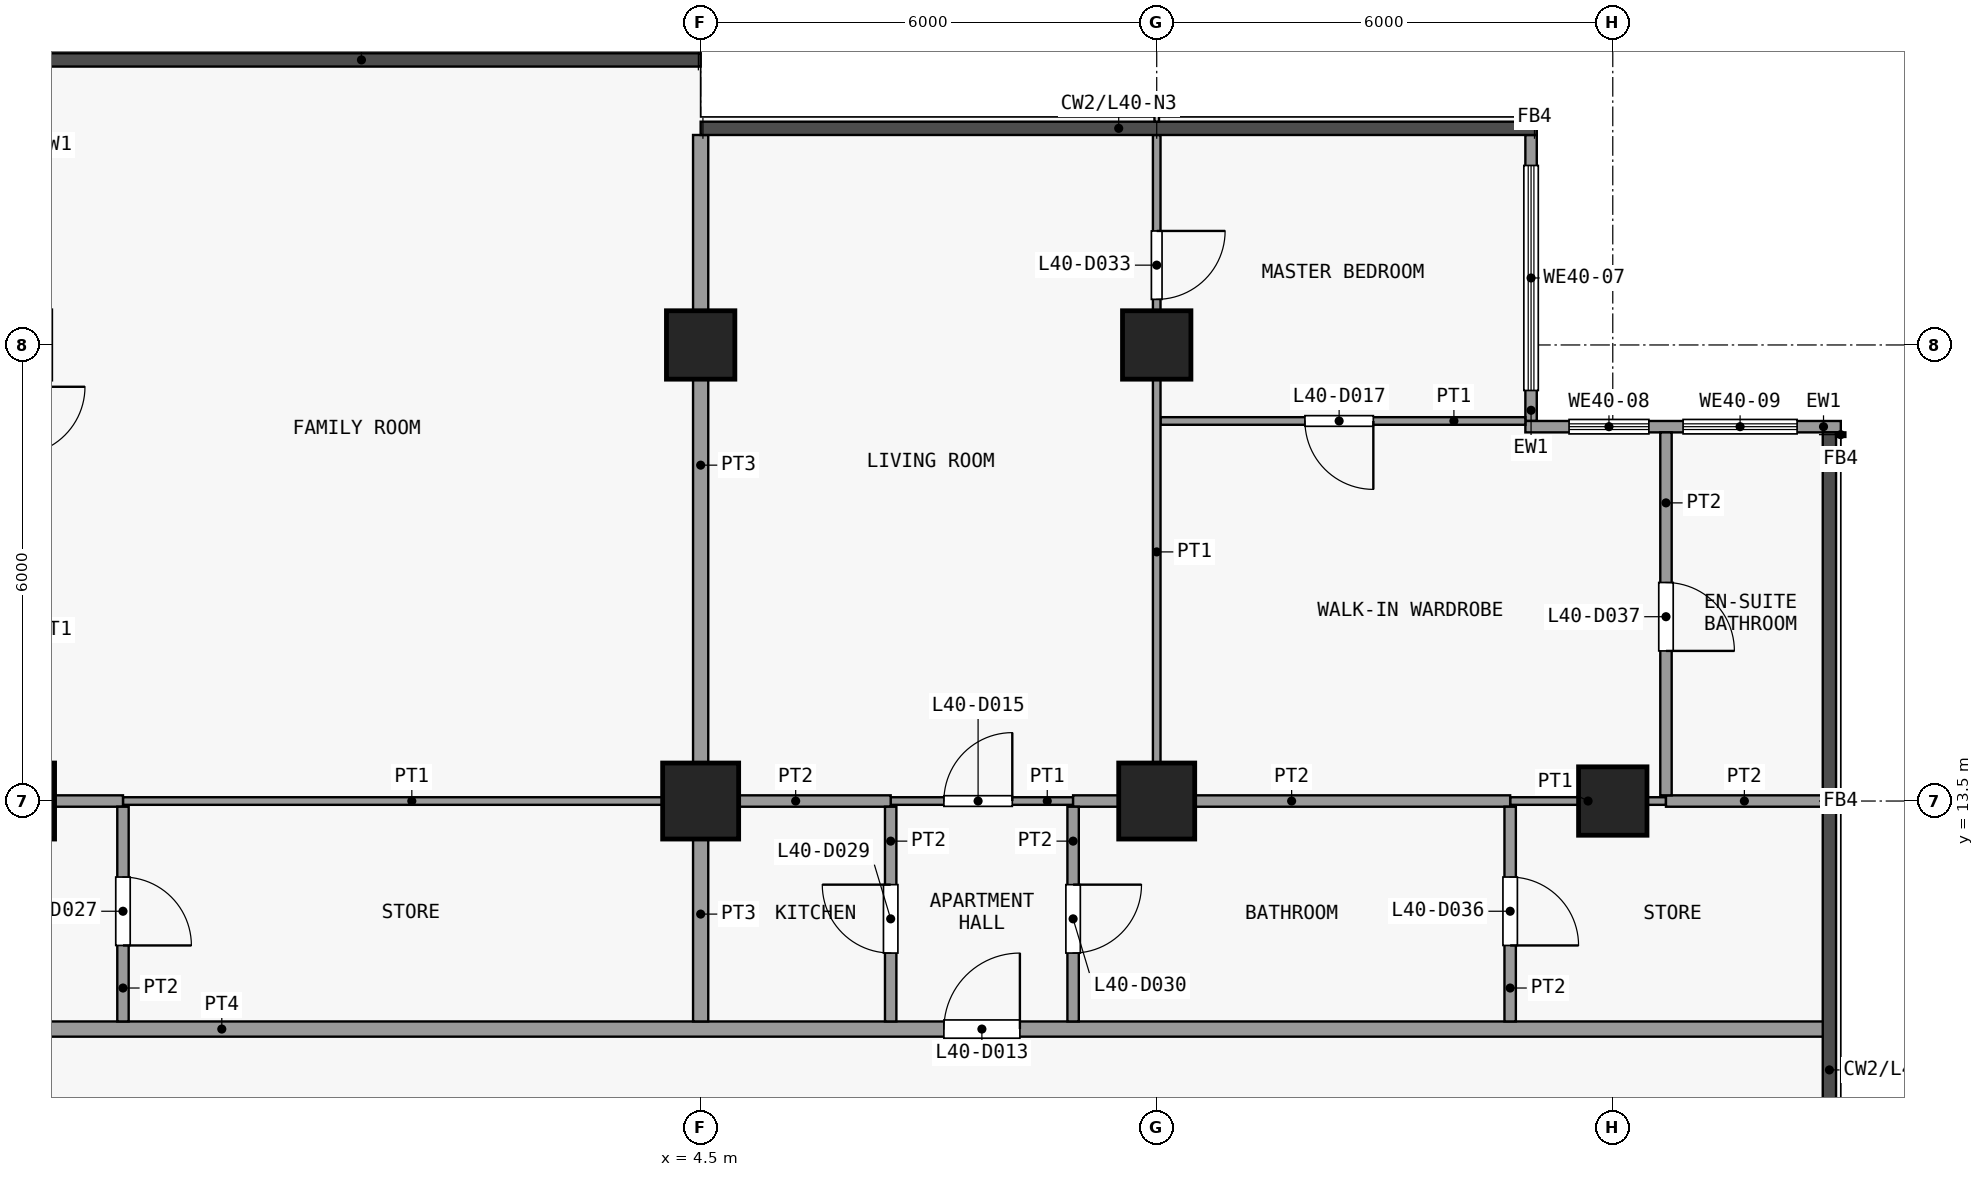
"""IFC4 building model, lengths in metres.
Left out: names, types, materials, properties, quantities, classifications, styles, units other than length and angle.
Written with IfcOpenShell. Run it as: python <this file> out.ifc"""

import sys

from ifc_helpers import new_model, si_unit, direction, frame, frame_2d, origin, origin_2d, place, context, subcontext, project, spatial, rectangle, extrude, element, fill, save


model = new_model("IFC4")
c1 = context("Model", 3, precision=1e-05, world=origin(), true_north=direction((0.0, 1.0)))
c2 = subcontext(c1, "Body", "Model", "MODEL_VIEW")
j1 = project(units=[si_unit("LENGTHUNIT", "METRE"), si_unit("PLANEANGLEUNIT", "RADIAN")], contexts=[c1])
p1 = place(None, origin())
s1 = spatial("IfcSite", under=j1, at=p1, CompositionType="ELEMENT")
p2 = place(p1, origin())
s2 = spatial("IfcBuilding", under=s1, at=p2, CompositionType="ELEMENT")
p3 = place(p2, frame((0.0, 0.0, 163.7)))
s3 = spatial("IfcBuildingStorey", under=s2, at=p3, CompositionType="ELEMENT", Elevation=163.7)
for number, where, z_axis, x_axis in (
    (1, (-4.5, 13.5, 0.0), (0.0, 0.0, 1.0), (1.0, 0.0, 0.0)),
    (2, (4.5, 13.5, 0.0), (0.0, 0.0, 1.0), (1.0, 0.0, 0.0)),
):
    element("IfcColumn", number, at=place(p3, frame(where, z_axis=z_axis, x_axis=x_axis)), inside=s3, PredefinedType="COLUMN", context=c2, shape_type="SweptSolid", body=[
        extrude(rectangle(XDim=1.0, YDim=1.0, at=origin_2d()), origin(), (0.0, 0.0, 1.0), 3.6),
    ])
p4 = place(p3, frame((4.5, 19.5, 0.0), z_axis=(0.0, 0.0, 1.0), x_axis=(1.0, 0.0, 0.0)))
e3 = element("IfcColumn", 3, at=p4, inside=s3, PredefinedType="COLUMN", context=c2, shape_type="SweptSolid", body=[
    extrude(rectangle(XDim=0.9, YDim=0.9, at=origin_2d()), origin(), (0.0, 0.0, 1.0), 3.6),
])
p5 = place(p3, frame((10.5, 13.5, 0.0), z_axis=(0.0, 0.0, 1.0), x_axis=(1.0, 0.0, 0.0)))
e4 = element("IfcColumn", 4, at=p5, inside=s3, PredefinedType="COLUMN", context=c2, shape_type="SweptSolid", body=[
    extrude(rectangle(XDim=1.0, YDim=1.0, at=origin_2d()), origin(), (0.0, 0.0, 1.0), 3.6),
])
for number, where, z_axis, x_axis in (
    (5, (10.5, 19.5, 0.0), (0.0, 0.0, 1.0), (1.0, 0.0, 0.0)),
    (6, (16.5, 13.5, 0.0), (0.0, 0.0, 1.0), (1.0, 0.0, 0.0)),
):
    element("IfcColumn", number, at=place(p3, frame(where, z_axis=z_axis, x_axis=x_axis)), inside=s3, PredefinedType="COLUMN", context=c2, shape_type="SweptSolid", body=[
        extrude(rectangle(XDim=0.9, YDim=0.9, at=origin_2d()), origin(), (0.0, 0.0, 1.0), 3.6),
    ])
p6 = place(p3, frame((15.425, 22.262, 0.0), z_axis=(0.0, 0.0, 1.0), x_axis=(0.0, -1.0, 0.0)))
e7 = element("IfcWall", 7, at=p6, inside=s3, PredefinedType="SOLIDWALL", context=c2, shape_type="SweptSolid", body=[
    extrude(rectangle(XDim=3.762, YDim=0.15, at=frame_2d((1.881, 0.0))), origin(), (0.0, 0.0, 1.0), 3.3),
])
p7 = place(p6, frame((0.401, 0.0, 0.9)))
e8 = element("IfcOpeningElement", 8, at=p7, cuts=e7, PredefinedType="OPENING", context=c2, shape_type="SweptSolid", body=[
    extrude(rectangle(XDim=2.96, YDim=2.4, at=frame_2d((1.48, 1.2))), frame((0.0, 0.085, 0.0), z_axis=(0.0, -1.0, 0.0), x_axis=(1.0, 0.0, 0.0)), (0.0, 0.0, 1.0), 0.17),
])
p8 = place(p3, frame((15.35, 18.425, 0.0), z_axis=(0.0, 0.0, 1.0), x_axis=(1.0, 0.0, 0.0)))
e9 = element("IfcWall", 9, at=p8, inside=s3, PredefinedType="SOLIDWALL", context=c2, shape_type="SweptSolid", body=[
    extrude(rectangle(XDim=4.15, YDim=0.15, at=frame_2d((2.075, 0.0))), origin(), (0.0, 0.0, 1.0), 3.3),
])
p9 = place(p8, frame((0.575, 0.0, 0.9)))
e10 = element("IfcOpeningElement", 10, at=p9, cuts=e9, PredefinedType="OPENING", context=c2, shape_type="SweptSolid", body=[
    extrude(rectangle(XDim=1.05, YDim=2.4, at=frame_2d((0.525, 1.2))), frame((0.0, 0.085, 0.0), z_axis=(0.0, -1.0, 0.0), x_axis=(1.0, 0.0, 0.0)), (0.0, 0.0, 1.0), 0.17),
])
p10 = place(p8, frame((2.075, 0.0, 0.9)))
e11 = element("IfcOpeningElement", 11, at=p10, cuts=e9, PredefinedType="OPENING", context=c2, shape_type="SweptSolid", body=[
    extrude(rectangle(XDim=1.5, YDim=2.4, at=frame_2d((0.75, 1.2))), frame((0.0, 0.085, 0.0), z_axis=(0.0, -1.0, 0.0), x_axis=(1.0, 0.0, 0.0)), (0.0, 0.0, 1.0), 0.17),
])
p11 = place(p3, frame((-17.85, 10.5, 0.0), z_axis=(0.0, 0.0, 1.0), x_axis=(1.0, 0.0, 0.0)))
e12 = element("IfcWall", 12, at=p11, inside=s3, PredefinedType="PARTITIONING", context=c2, shape_type="SweptSolid", body=[
    extrude(rectangle(XDim=37.2, YDim=0.2, at=frame_2d((18.6, 0.0))), origin(), (0.0, 0.0, 1.0), 3.3),
])
p12 = place(p11, frame((5.55, 0.0, 0.0)))
e13 = element("IfcOpeningElement", 13, at=p12, cuts=e12, PredefinedType="OPENING", context=c2, shape_type="SweptSolid", body=[
    extrude(rectangle(XDim=1.0, YDim=2.1, at=frame_2d((0.5, 1.05))), frame((0.0, 0.11, 0.0), z_axis=(0.0, -1.0, 0.0), x_axis=(1.0, 0.0, 0.0)), (0.0, 0.0, 1.0), 0.22),
])
p13 = place(p11, frame((25.55, 0.0, 0.0)))
e14 = element("IfcOpeningElement", 14, at=p13, cuts=e12, PredefinedType="OPENING", context=c2, shape_type="SweptSolid", body=[
    extrude(rectangle(XDim=1.0, YDim=2.1, at=frame_2d((0.5, 1.05))), frame((0.0, 0.11, 0.0), z_axis=(0.0, -1.0, 0.0), x_axis=(1.0, 0.0, 0.0)), (0.0, 0.0, 1.0), 0.22),
])
p14 = place(p3, frame((-3.1, 13.5, 0.0), z_axis=(0.0, 0.0, 1.0), x_axis=(1.0, 0.0, 0.0)))
e15 = element("IfcWall", 15, at=p14, inside=s3, PredefinedType="PARTITIONING", context=c2, shape_type="SweptSolid", body=[
    extrude(rectangle(XDim=7.6, YDim=0.1, at=frame_2d((3.8, 0.0))), origin(), (0.0, 0.0, 1.0), 3.3),
])
p15 = place(p3, frame((7.0, 13.5, 0.0), z_axis=(0.0, 0.0, 1.0), x_axis=(1.0, 0.0, 0.0)))
e16 = element("IfcWall", 16, at=p15, inside=s3, PredefinedType="PARTITIONING", context=c2, shape_type="SweptSolid", body=[
    extrude(rectangle(XDim=2.4, YDim=0.1, at=frame_2d((1.2, 0.0))), origin(), (0.0, 0.0, 1.0), 3.3),
])
p16 = place(p15, frame((0.7, 0.0, 0.0)))
e17 = element("IfcOpeningElement", 17, at=p16, cuts=e16, PredefinedType="OPENING", context=c2, shape_type="SweptSolid", body=[
    extrude(rectangle(XDim=0.9, YDim=2.1, at=frame_2d((0.45, 1.05))), frame((0.0, 0.06, 0.0), z_axis=(0.0, -1.0, 0.0), x_axis=(1.0, 0.0, 0.0)), (0.0, 0.0, 1.0), 0.12),
])
p17 = place(p3, frame((15.15, 13.5, 0.0), z_axis=(0.0, 0.0, 1.0), x_axis=(1.0, 0.0, 0.0)))
e18 = element("IfcWall", 18, at=p17, inside=s3, PredefinedType="PARTITIONING", context=c2, shape_type="SweptSolid", body=[
    extrude(rectangle(XDim=2.05, YDim=0.1, at=frame_2d((1.025, 0.0))), origin(), (0.0, 0.0, 1.0), 3.3),
])
p18 = place(p3, frame((-10.5, 13.5, 0.0), z_axis=(0.0, 0.0, 1.0), x_axis=(1.0, 0.0, 0.0)))
e19 = element("IfcWall", 19, at=p18, inside=s3, PredefinedType="PARTITIONING", context=c2, shape_type="SweptSolid", body=[
    extrude(rectangle(XDim=7.4, YDim=0.15, at=frame_2d((3.7, 0.0))), origin(), (0.0, 0.0, 1.0), 3.3),
])
p19 = place(p3, frame((4.5, 13.5, 0.0), z_axis=(0.0, 0.0, 1.0), x_axis=(1.0, 0.0, 0.0)))
e20 = element("IfcWall", 20, at=p19, inside=s3, PredefinedType="PARTITIONING", context=c2, shape_type="SweptSolid", body=[
    extrude(rectangle(XDim=2.5, YDim=0.15, at=frame_2d((1.25, 0.0))), origin(), (0.0, 0.0, 1.0), 3.3),
])
p20 = place(p3, frame((9.4, 13.5, 0.0), z_axis=(0.0, 0.0, 1.0), x_axis=(1.0, 0.0, 0.0)))
e21 = element("IfcWall", 21, at=p20, inside=s3, PredefinedType="PARTITIONING", context=c2, shape_type="SweptSolid", body=[
    extrude(rectangle(XDim=5.75, YDim=0.15, at=frame_2d((2.875, 0.0))), origin(), (0.0, 0.0, 1.0), 3.3),
])
p21 = place(p3, frame((17.2, 13.5, 0.0), z_axis=(0.0, 0.0, 1.0), x_axis=(1.0, 0.0, 0.0)))
e22 = element("IfcWall", 22, at=p21, inside=s3, PredefinedType="PARTITIONING", context=c2, shape_type="SweptSolid", body=[
    extrude(rectangle(XDim=2.062, YDim=0.15, at=frame_2d((1.031, 0.0))), origin(), (0.0, 0.0, 1.0), 3.3),
])
p22 = place(p3, frame((10.55, 18.5, 0.0), z_axis=(0.0, 0.0, 1.0), x_axis=(1.0, 0.0, 0.0)))
e23 = element("IfcWall", 23, at=p22, inside=s3, PredefinedType="PARTITIONING", context=c2, shape_type="SweptSolid", body=[
    extrude(rectangle(XDim=4.8, YDim=0.1, at=frame_2d((2.4, 0.0))), origin(), (0.0, 0.0, 1.0), 3.3),
])
p23 = place(p22, frame((1.9, 0.0, 0.0)))
e24 = element("IfcOpeningElement", 24, at=p23, cuts=e23, PredefinedType="OPENING", context=c2, shape_type="SweptSolid", body=[
    extrude(rectangle(XDim=0.9, YDim=2.1, at=frame_2d((0.45, 1.05))), frame((0.0, 0.06, 0.0), z_axis=(0.0, -1.0, 0.0), x_axis=(1.0, 0.0, 0.0)), (0.0, 0.0, 1.0), 0.12),
])
p24 = place(p3, frame((-3.1, 10.6, 0.0), z_axis=(0.0, 0.0, 1.0), x_axis=(0.0, 1.0, 0.0)))
e25 = element("IfcWall", 25, at=p24, inside=s3, PredefinedType="PARTITIONING", context=c2, shape_type="SweptSolid", body=[
    extrude(rectangle(XDim=2.825, YDim=0.15, at=frame_2d((1.413, 0.0))), origin(), (0.0, 0.0, 1.0), 3.3),
])
p25 = place(p24, frame((1.0, 0.0, 0.0)))
e26 = element("IfcOpeningElement", 26, at=p25, cuts=e25, PredefinedType="OPENING", context=c2, shape_type="SweptSolid", body=[
    extrude(rectangle(XDim=0.9, YDim=2.1, at=frame_2d((0.45, 1.05))), frame((0.0, 0.085, 0.0), z_axis=(0.0, -1.0, 0.0), x_axis=(1.0, 0.0, 0.0)), (0.0, 0.0, 1.0), 0.17),
])
p26 = place(p3, frame((4.5, 10.6, 0.0), z_axis=(0.0, 0.0, 1.0), x_axis=(0.0, 1.0, 0.0)))
e27 = element("IfcWall", 27, at=p26, inside=s3, PredefinedType="PARTITIONING", context=c2, shape_type="SweptSolid", body=[
    extrude(rectangle(XDim=2.825, YDim=0.2, at=frame_2d((1.413, 0.0))), origin(), (0.0, 0.0, 1.0), 3.3),
])
p27 = place(p3, frame((4.5, 13.575, 0.0), z_axis=(0.0, 0.0, 1.0), x_axis=(0.0, 1.0, 0.0)))
e28 = element("IfcWall", 28, at=p27, inside=s3, PredefinedType="PARTITIONING", context=c2, shape_type="SweptSolid", body=[
    extrude(rectangle(XDim=8.688, YDim=0.2, at=frame_2d((4.344, 0.0))), origin(), (0.0, 0.0, 1.0), 3.3),
])
p28 = place(p3, frame((7.0, 10.6, 0.0), z_axis=(0.0, 0.0, 1.0), x_axis=(0.0, 1.0, 0.0)))
e29 = element("IfcWall", 29, at=p28, inside=s3, PredefinedType="PARTITIONING", context=c2, shape_type="SweptSolid", body=[
    extrude(rectangle(XDim=2.825, YDim=0.15, at=frame_2d((1.413, 0.0))), origin(), (0.0, 0.0, 1.0), 3.3),
])
p29 = place(p28, frame((0.9, 0.0, 0.0)))
e30 = element("IfcOpeningElement", 30, at=p29, cuts=e29, PredefinedType="OPENING", context=c2, shape_type="SweptSolid", body=[
    extrude(rectangle(XDim=0.9, YDim=2.1, at=frame_2d((0.45, 1.05))), frame((0.0, 0.085, 0.0), z_axis=(0.0, -1.0, 0.0), x_axis=(1.0, 0.0, 0.0)), (0.0, 0.0, 1.0), 0.17),
])
p30 = place(p3, frame((9.4, 10.6, 0.0), z_axis=(0.0, 0.0, 1.0), x_axis=(0.0, 1.0, 0.0)))
e31 = element("IfcWall", 31, at=p30, inside=s3, PredefinedType="PARTITIONING", context=c2, shape_type="SweptSolid", body=[
    extrude(rectangle(XDim=2.825, YDim=0.15, at=frame_2d((1.413, 0.0))), origin(), (0.0, 0.0, 1.0), 3.3),
])
p31 = place(p30, frame((0.9, 0.0, 0.0)))
e32 = element("IfcOpeningElement", 32, at=p31, cuts=e31, PredefinedType="OPENING", context=c2, shape_type="SweptSolid", body=[
    extrude(rectangle(XDim=0.9, YDim=2.1, at=frame_2d((0.45, 1.05))), frame((0.0, 0.085, 0.0), z_axis=(0.0, -1.0, 0.0), x_axis=(1.0, 0.0, 0.0)), (0.0, 0.0, 1.0), 0.17),
])
p32 = place(p3, frame((10.5, 13.575, 0.0), z_axis=(0.0, 0.0, 1.0), x_axis=(0.0, 1.0, 0.0)))
e33 = element("IfcWall", 33, at=p32, inside=s3, PredefinedType="PARTITIONING", context=c2, shape_type="SweptSolid", body=[
    extrude(rectangle(XDim=8.688, YDim=0.1, at=frame_2d((4.344, 0.0))), origin(), (0.0, 0.0, 1.0), 3.3),
])
p33 = place(p32, frame((6.525, 0.0, 0.0)))
e34 = element("IfcOpeningElement", 34, at=p33, cuts=e33, PredefinedType="OPENING", context=c2, shape_type="SweptSolid", body=[
    extrude(rectangle(XDim=0.9, YDim=2.1, at=frame_2d((0.45, 1.05))), frame((0.0, 0.06, 0.0), z_axis=(0.0, -1.0, 0.0), x_axis=(1.0, 0.0, 0.0)), (0.0, 0.0, 1.0), 0.12),
])
p34 = place(p3, frame((15.15, 10.6, 0.0), z_axis=(0.0, 0.0, 1.0), x_axis=(0.0, 1.0, 0.0)))
e35 = element("IfcWall", 35, at=p34, inside=s3, PredefinedType="PARTITIONING", context=c2, shape_type="SweptSolid", body=[
    extrude(rectangle(XDim=2.825, YDim=0.15, at=frame_2d((1.413, 0.0))), origin(), (0.0, 0.0, 1.0), 3.3),
])
p35 = place(p34, frame((1.0, 0.0, 0.0)))
e36 = element("IfcOpeningElement", 36, at=p35, cuts=e35, PredefinedType="OPENING", context=c2, shape_type="SweptSolid", body=[
    extrude(rectangle(XDim=0.9, YDim=2.1, at=frame_2d((0.45, 1.05))), frame((0.0, 0.085, 0.0), z_axis=(0.0, -1.0, 0.0), x_axis=(1.0, 0.0, 0.0)), (0.0, 0.0, 1.0), 0.17),
])
p36 = place(p3, frame((17.2, 13.575, 0.0), z_axis=(0.0, 0.0, 1.0), x_axis=(0.0, 1.0, 0.0)))
e37 = element("IfcWall", 37, at=p36, inside=s3, PredefinedType="PARTITIONING", context=c2, shape_type="SweptSolid", body=[
    extrude(rectangle(XDim=4.775, YDim=0.15, at=frame_2d((2.388, 0.0))), origin(), (0.0, 0.0, 1.0), 3.3),
])
p37 = place(p36, frame((1.9, 0.0, 0.0)))
e38 = element("IfcOpeningElement", 38, at=p37, cuts=e37, PredefinedType="OPENING", context=c2, shape_type="SweptSolid", body=[
    extrude(rectangle(XDim=0.9, YDim=2.1, at=frame_2d((0.45, 1.05))), frame((0.0, 0.085, 0.0), z_axis=(0.0, -1.0, 0.0), x_axis=(1.0, 0.0, 0.0)), (0.0, 0.0, 1.0), 0.17),
])
p38 = place(p7, origin())
e39 = element("IfcWindow", 39, at=p38, inside=s3, PartitioningType="SINGLE_PANEL", PredefinedType="WINDOW", context=c2, shape_type="SweptSolid", body=[
    extrude(rectangle(XDim=2.96, YDim=2.4, at=frame_2d((1.48, 1.2))), frame((0.0, 0.03, 0.0), z_axis=(0.0, -1.0, 0.0), x_axis=(1.0, 0.0, 0.0)), (0.0, 0.0, 1.0), 0.06),
])
fill(e8, e39)
p39 = place(p9, origin())
e40 = element("IfcWindow", 40, at=p39, inside=s3, PartitioningType="SINGLE_PANEL", PredefinedType="WINDOW", context=c2, shape_type="SweptSolid", body=[
    extrude(rectangle(XDim=1.05, YDim=2.4, at=frame_2d((0.525, 1.2))), frame((0.0, 0.03, 0.0), z_axis=(0.0, -1.0, 0.0), x_axis=(1.0, 0.0, 0.0)), (0.0, 0.0, 1.0), 0.06),
])
fill(e10, e40)
p40 = place(p10, origin())
e41 = element("IfcWindow", 41, at=p40, inside=s3, PartitioningType="SINGLE_PANEL", PredefinedType="WINDOW", context=c2, shape_type="SweptSolid", body=[
    extrude(rectangle(XDim=1.5, YDim=2.4, at=frame_2d((0.75, 1.2))), frame((0.0, 0.03, 0.0), z_axis=(0.0, -1.0, 0.0), x_axis=(1.0, 0.0, 0.0)), (0.0, 0.0, 1.0), 0.06),
])
fill(e11, e41)
p41 = place(p13, origin())
e42 = element("IfcDoor", 42, at=p41, inside=s3, OperationType="SINGLE_SWING_LEFT", PredefinedType="DOOR", context=c2, shape_type="SweptSolid", body=[
    extrude(rectangle(XDim=1.0, YDim=2.1, at=frame_2d((0.5, 1.05))), frame((0.0, 0.025, 0.0), z_axis=(0.0, -1.0, 0.0), x_axis=(1.0, 0.0, 0.0)), (0.0, 0.0, 1.0), 0.05),
])
fill(e14, e42)
p42 = place(p16, origin())
e43 = element("IfcDoor", 43, at=p42, inside=s3, OperationType="SINGLE_SWING_LEFT", PredefinedType="DOOR", context=c2, shape_type="SweptSolid", body=[
    extrude(rectangle(XDim=0.9, YDim=2.1, at=frame_2d((0.45, 1.05))), frame((0.0, 0.025, 0.0), z_axis=(0.0, -1.0, 0.0), x_axis=(1.0, 0.0, 0.0)), (0.0, 0.0, 1.0), 0.05),
])
fill(e17, e43)
p43 = place(p23, origin())
e44 = element("IfcDoor", 44, at=p43, inside=s3, OperationType="SINGLE_SWING_RIGHT", PredefinedType="DOOR", context=c2, shape_type="SweptSolid", body=[
    extrude(rectangle(XDim=0.9, YDim=2.1, at=frame_2d((0.45, 1.05))), frame((0.0, 0.025, 0.0), z_axis=(0.0, -1.0, 0.0), x_axis=(1.0, 0.0, 0.0)), (0.0, 0.0, 1.0), 0.05),
])
fill(e24, e44)
p44 = place(p25, origin())
e45 = element("IfcDoor", 45, at=p44, inside=s3, OperationType="SINGLE_SWING_LEFT", PredefinedType="DOOR", context=c2, shape_type="SweptSolid", body=[
    extrude(rectangle(XDim=0.9, YDim=2.1, at=frame_2d((0.45, 1.05))), frame((0.0, 0.025, 0.0), z_axis=(0.0, -1.0, 0.0), x_axis=(1.0, 0.0, 0.0)), (0.0, 0.0, 1.0), 0.05),
])
fill(e26, e45)
p45 = place(p29, origin())
e46 = element("IfcDoor", 46, at=p45, inside=s3, OperationType="SINGLE_SWING_LEFT", PredefinedType="DOOR", context=c2, shape_type="SweptSolid", body=[
    extrude(rectangle(XDim=0.9, YDim=2.1, at=frame_2d((0.45, 1.05))), frame((0.0, 0.025, 0.0), z_axis=(0.0, -1.0, 0.0), x_axis=(1.0, 0.0, 0.0)), (0.0, 0.0, 1.0), 0.05),
])
fill(e30, e46)
p46 = place(p31, origin())
e47 = element("IfcDoor", 47, at=p46, inside=s3, OperationType="SINGLE_SWING_RIGHT", PredefinedType="DOOR", context=c2, shape_type="SweptSolid", body=[
    extrude(rectangle(XDim=0.9, YDim=2.1, at=frame_2d((0.45, 1.05))), frame((0.0, 0.025, 0.0), z_axis=(0.0, -1.0, 0.0), x_axis=(1.0, 0.0, 0.0)), (0.0, 0.0, 1.0), 0.05),
])
fill(e32, e47)
p47 = place(p33, origin())
e48 = element("IfcDoor", 48, at=p47, inside=s3, OperationType="SINGLE_SWING_RIGHT", PredefinedType="DOOR", context=c2, shape_type="SweptSolid", body=[
    extrude(rectangle(XDim=0.9, YDim=2.1, at=frame_2d((0.45, 1.05))), frame((0.0, 0.025, 0.0), z_axis=(0.0, -1.0, 0.0), x_axis=(1.0, 0.0, 0.0)), (0.0, 0.0, 1.0), 0.05),
])
fill(e34, e48)
p48 = place(p35, origin())
e49 = element("IfcDoor", 49, at=p48, inside=s3, OperationType="SINGLE_SWING_LEFT", PredefinedType="DOOR", context=c2, shape_type="SweptSolid", body=[
    extrude(rectangle(XDim=0.9, YDim=2.1, at=frame_2d((0.45, 1.05))), frame((0.0, 0.025, 0.0), z_axis=(0.0, -1.0, 0.0), x_axis=(1.0, 0.0, 0.0)), (0.0, 0.0, 1.0), 0.05),
])
fill(e36, e49)
p49 = place(p37, origin())
e50 = element("IfcDoor", 50, at=p49, inside=s3, OperationType="SINGLE_SWING_LEFT", PredefinedType="DOOR", context=c2, shape_type="SweptSolid", body=[
    extrude(rectangle(XDim=0.9, YDim=2.1, at=frame_2d((0.45, 1.05))), frame((0.0, 0.025, 0.0), z_axis=(0.0, -1.0, 0.0), x_axis=(1.0, 0.0, 0.0)), (0.0, 0.0, 1.0), 0.05),
])
fill(e38, e50)
save(model, sys.argv[1])
